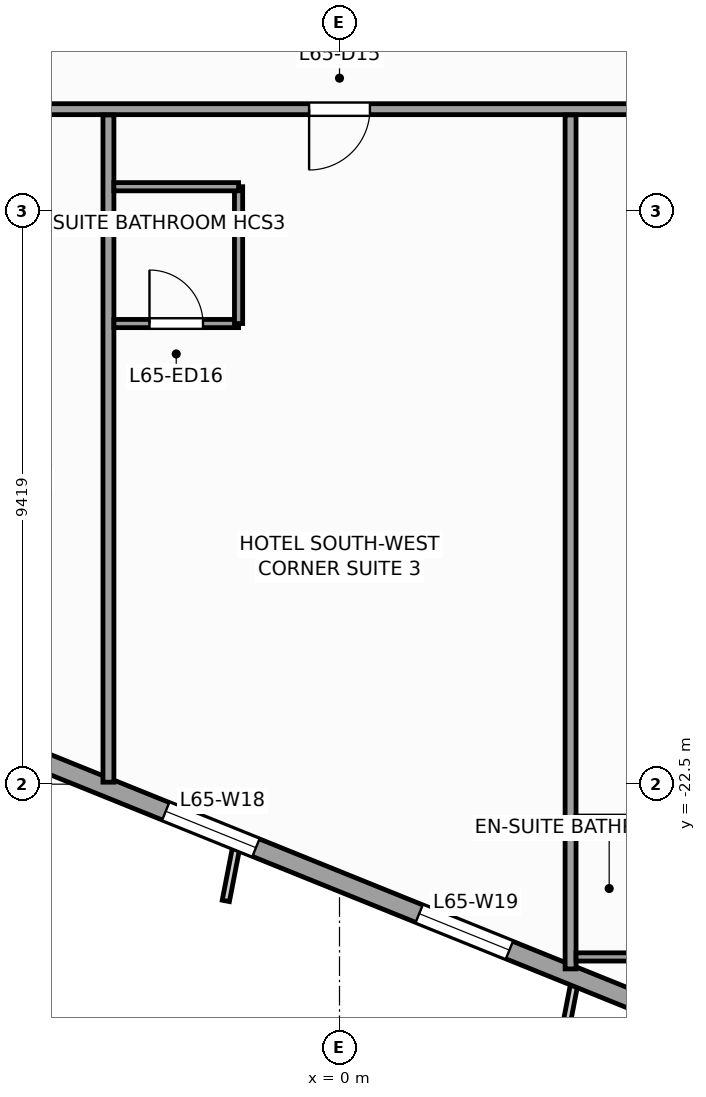
"""IFC4 building model, lengths in metres.
Left out: names, types, materials, properties, quantities, classifications, styles, units other than length and angle.
Written with IfcOpenShell. Run it as: python <this file> out.ifc"""

import sys

from ifc_helpers import new_model, si_unit, direction, frame, frame_2d, origin, place, context, subcontext, project, spatial, rectangle, extrude, source, transform, mapped, element, fill, save


model = new_model("IFC4")
c1 = context("Model", 3, precision=1e-05, world=origin(), true_north=direction((0.0, 1.0)))
c2 = subcontext(c1, "Body", "Model", "MODEL_VIEW")
j1 = project(units=[si_unit("LENGTHUNIT", "METRE"), si_unit("PLANEANGLEUNIT", "RADIAN")], contexts=[c1])
p1 = place(None, origin())
s1 = spatial("IfcSite", under=j1, at=p1, CompositionType="ELEMENT")
p2 = place(p1, origin())
s2 = spatial("IfcBuilding", under=s1, at=p2, CompositionType="ELEMENT")
p3 = place(p2, frame((0.0, 0.0, 268.8)))
s3 = spatial("IfcBuildingStorey", under=s2, at=p3, CompositionType="ELEMENT", Elevation=268.8)
p4 = place(p3, frame((-23.813, -14.479, 0.0), z_axis=(0.0, 0.0, 1.0), x_axis=(0.927182657188, -0.374609557019, 0.0)))
e1 = element("IfcWall", 1, at=p4, inside=s3, PredefinedType="STANDARD", context=c2, shape_type="SweptSolid", body=[
    extrude(rectangle(XDim=33.31, YDim=0.31, at=frame_2d((16.655, 0.0))), origin(), (0.0, 0.0, 1.0), 2.75),
])
p5 = place(p4, frame((3.197, 0.0, 0.47)))
e2 = element("IfcOpeningElement", 2, at=p5, cuts=e1, PredefinedType="OPENING", context=c2, shape_type="SweptSolid", body=[
    extrude(rectangle(XDim=1.6, YDim=2.1, at=frame_2d((0.8, 1.05))), frame((0.0, 0.165, 0.0), z_axis=(0.0, -1.0, 0.0), x_axis=(1.0, 0.0, 0.0)), (0.0, 0.0, 1.0), 0.33),
])
p6 = place(p4, frame((8.86, 0.0, 0.47)))
e3 = element("IfcOpeningElement", 3, at=p6, cuts=e1, PredefinedType="OPENING", context=c2, shape_type="SweptSolid", body=[
    extrude(rectangle(XDim=1.6, YDim=2.1, at=frame_2d((0.8, 1.05))), frame((0.0, 0.165, 0.0), z_axis=(0.0, -1.0, 0.0), x_axis=(1.0, 0.0, 0.0)), (0.0, 0.0, 1.0), 0.33),
])
p7 = place(p4, frame((14.439, 0.0, 0.47)))
e4 = element("IfcOpeningElement", 4, at=p7, cuts=e1, PredefinedType="OPENING", context=c2, shape_type="SweptSolid", body=[
    extrude(rectangle(XDim=1.6, YDim=2.1, at=frame_2d((0.8, 1.05))), frame((0.0, 0.165, 0.0), z_axis=(0.0, -1.0, 0.0), x_axis=(1.0, 0.0, 0.0)), (0.0, 0.0, 1.0), 0.33),
])
p8 = place(p4, frame((22.601, 0.0, 0.47)))
e5 = element("IfcOpeningElement", 5, at=p8, cuts=e1, PredefinedType="OPENING", context=c2, shape_type="SweptSolid", body=[
    extrude(rectangle(XDim=1.6, YDim=2.1, at=frame_2d((0.8, 1.05))), frame((0.0, 0.165, 0.0), z_axis=(0.0, -1.0, 0.0), x_axis=(1.0, 0.0, 0.0)), (0.0, 0.0, 1.0), 0.33),
])
p9 = place(p4, frame((27.097, 0.0, 0.47)))
e6 = element("IfcOpeningElement", 6, at=p9, cuts=e1, PredefinedType="OPENING", context=c2, shape_type="SweptSolid", body=[
    extrude(rectangle(XDim=1.6, YDim=2.1, at=frame_2d((0.8, 1.05))), frame((0.0, 0.165, 0.0), z_axis=(0.0, -1.0, 0.0), x_axis=(1.0, 0.0, 0.0)), (0.0, 0.0, 1.0), 0.33),
])
p10 = place(p3, frame((-10.3, -11.4, 0.0), z_axis=(0.0, 0.0, 1.0), x_axis=(1.0, 0.0, 0.0)))
e7 = element("IfcWall", 7, at=p10, inside=s3, PredefinedType="PARTITIONING", context=c2, shape_type="SweptSolid", body=[
    extrude(rectangle(XDim=21.7, YDim=0.18, at=frame_2d((10.85, 0.0))), origin(), (0.0, 0.0, 1.0), 3.35),
])
p11 = place(p10, frame((1.605, 0.0, 0.0)))
e8 = element("IfcOpeningElement", 8, at=p11, cuts=e7, PredefinedType="OPENING", context=c2, shape_type="SweptSolid", body=[
    extrude(rectangle(XDim=0.95, YDim=2.1, at=frame_2d((0.475, 1.05))), frame((0.0, 0.1, 0.0), z_axis=(0.0, -1.0, 0.0), x_axis=(1.0, 0.0, 0.0)), (0.0, 0.0, 1.0), 0.2),
])
p12 = place(p10, frame((17.236, 0.0, 0.0)))
e9 = element("IfcOpeningElement", 9, at=p12, cuts=e7, PredefinedType="OPENING", context=c2, shape_type="SweptSolid", body=[
    extrude(rectangle(XDim=1.0, YDim=2.15, at=frame_2d((0.5, 1.075))), frame((0.0, 0.1, 0.0), z_axis=(0.0, -1.0, 0.0), x_axis=(1.0, 0.0, 0.0)), (0.0, 0.0, 1.0), 0.2),
])
p13 = place(p10, frame((9.8, 0.0, 0.0)))
e10 = element("IfcOpeningElement", 10, at=p13, cuts=e7, PredefinedType="OPENING", context=c2, shape_type="SweptSolid", body=[
    extrude(rectangle(XDim=1.0, YDim=2.15, at=frame_2d((0.5, 1.075))), frame((0.0, 0.1, 0.0), z_axis=(0.0, -1.0, 0.0), x_axis=(1.0, 0.0, 0.0)), (0.0, 0.0, 1.0), 0.2),
])
p14 = place(p3, frame((3.8, -11.495, 0.0), z_axis=(0.0, 0.0, 1.0), x_axis=(0.0, -1.0, 0.0)))
e11 = element("IfcWall", 11, at=p14, inside=s3, PredefinedType="PARTITIONING", context=c2, shape_type="SweptSolid", body=[
    extrude(rectangle(XDim=14.043, YDim=0.18, at=frame_2d((7.021, 0.0))), origin(), (0.0, 0.0, 1.0), 3.35),
])
p15 = place(p3, frame((-3.8, -11.495, 0.0), z_axis=(0.0, 0.0, 1.0), x_axis=(0.0, -1.0, 0.0)))
e12 = element("IfcWall", 12, at=p15, inside=s3, PredefinedType="PARTITIONING", context=c2, shape_type="SweptSolid", body=[
    extrude(rectangle(XDim=10.972, YDim=0.18, at=frame_2d((5.486, 0.0))), origin(), (0.0, 0.0, 1.0), 3.35),
])
p16 = place(p3, frame((3.89, -25.342, 0.0), z_axis=(0.0, 0.0, 1.0), x_axis=(1.0, 0.0, 0.0)))
e13 = element("IfcWall", 13, at=p16, inside=s3, PredefinedType="PARTITIONING", context=c2, shape_type="SweptSolid", body=[
    extrude(rectangle(XDim=2.05, YDim=0.135, at=frame_2d((1.025, 0.0))), origin(), (0.0, 0.0, 1.0), 2.75),
])
p17 = place(p3, frame((3.89, -23.092, 0.0), z_axis=(0.0, 0.0, 1.0), x_axis=(1.0, 0.0, 0.0)))
e14 = element("IfcWall", 14, at=p17, inside=s3, PredefinedType="PARTITIONING", context=c2, shape_type="SweptSolid", body=[
    extrude(rectangle(XDim=2.05, YDim=0.135, at=frame_2d((1.025, 0.0))), origin(), (0.0, 0.0, 1.0), 2.95),
])
p18 = place(p3, frame((-3.71, -14.925, 0.0), z_axis=(0.0, 0.0, 1.0), x_axis=(1.0, 0.0, 0.0)))
e15 = element("IfcWall", 15, at=p18, inside=s3, PredefinedType="PARTITIONING", context=c2, shape_type="SweptSolid", body=[
    extrude(rectangle(XDim=2.05, YDim=0.135, at=frame_2d((1.025, 0.0))), origin(), (0.0, 0.0, 1.0), 3.35),
])
p19 = place(p18, frame((0.585, 0.0, 0.0)))
e16 = element("IfcOpeningElement", 16, at=p19, cuts=e15, PredefinedType="OPENING", context=c2, shape_type="SweptSolid", body=[
    extrude(rectangle(XDim=0.88, YDim=2.1, at=frame_2d((0.44, 1.05))), frame((0.0, 0.078, 0.0), z_axis=(0.0, -1.0, 0.0), x_axis=(1.0, 0.0, 0.0)), (0.0, 0.0, 1.0), 0.155),
])
p20 = place(p3, frame((-1.66, -14.925, 0.0), z_axis=(0.0, 0.0, 1.0), x_axis=(0.0, 1.0, 0.0)))
e17 = element("IfcWall", 17, at=p20, inside=s3, PredefinedType="PARTITIONING", context=c2, shape_type="SweptSolid", body=[
    extrude(rectangle(XDim=2.25, YDim=0.135, at=frame_2d((1.125, 0.0))), origin(), (0.0, 0.0, 1.0), 3.35),
])
p21 = place(p3, frame((-3.71, -12.675, 0.0), z_axis=(0.0, 0.0, 1.0), x_axis=(1.0, 0.0, 0.0)))
e18 = element("IfcWall", 18, at=p21, inside=s3, PredefinedType="PARTITIONING", context=c2, shape_type="SweptSolid", body=[
    extrude(rectangle(XDim=2.05, YDim=0.135, at=frame_2d((1.025, 0.0))), origin(), (0.0, 0.0, 1.0), 3.35),
])
m1 = source(origin(), c2, "Body", "SweptSolid", [
    extrude(rectangle(XDim=1.6, YDim=2.1, at=frame_2d((0.8, 1.05))), frame((0.0, 0.03, 0.0), z_axis=(0.0, -1.0, 0.0), x_axis=(1.0, 0.0, 0.0)), (0.0, 0.0, 1.0), 0.06),
])
p22 = place(p8, origin())
e19 = element("IfcWindow", 19, at=p22, inside=s3, PartitioningType="SINGLE_PANEL", PredefinedType="WINDOW", context=c2, shape_type="MappedRepresentation", body=[
    mapped(m1, transform((0.0, 0.0, 0.0), scale=1.0)),
])
fill(e5, e19)
p23 = place(p9, origin())
e20 = element("IfcWindow", 20, at=p23, inside=s3, PartitioningType="SINGLE_PANEL", PredefinedType="WINDOW", context=c2, shape_type="MappedRepresentation", body=[
    mapped(m1, transform((0.0, 0.0, 0.0), scale=1.0)),
])
fill(e6, e20)
m2 = source(origin(), c2, "Body", "SweptSolid", [
    extrude(rectangle(XDim=1.0, YDim=2.15, at=frame_2d((0.5, 1.075))), frame((0.0, 0.025, 0.0), z_axis=(0.0, -1.0, 0.0), x_axis=(1.0, 0.0, 0.0)), (0.0, 0.0, 1.0), 0.05),
])
p24 = place(p13, frame((1.0, 0.0, 0.0), z_axis=(0.0, 0.0, 1.0), x_axis=(-1.0, 0.0, 0.0)))
e21 = element("IfcDoor", 21, at=p24, inside=s3, OperationType="SINGLE_SWING_LEFT", PredefinedType="DOOR", context=c2, shape_type="MappedRepresentation", body=[
    mapped(m2, transform((0.0, 0.0, 0.0), scale=1.0)),
])
fill(e10, e21)
m3 = source(origin(), c2, "Body", "SweptSolid", [
    extrude(rectangle(XDim=0.88, YDim=2.1, at=frame_2d((0.44, 1.05))), frame((0.0, 0.025, 0.0), z_axis=(0.0, -1.0, 0.0), x_axis=(1.0, 0.0, 0.0)), (0.0, 0.0, 1.0), 0.05),
])
p25 = place(p19, origin())
e22 = element("IfcDoor", 22, at=p25, inside=s3, OperationType="SINGLE_SWING_LEFT", PredefinedType="DOOR", context=c2, shape_type="MappedRepresentation", body=[
    mapped(m3, transform((0.0, 0.0, 0.0), scale=1.0)),
])
fill(e16, e22)
save(model, sys.argv[1])
